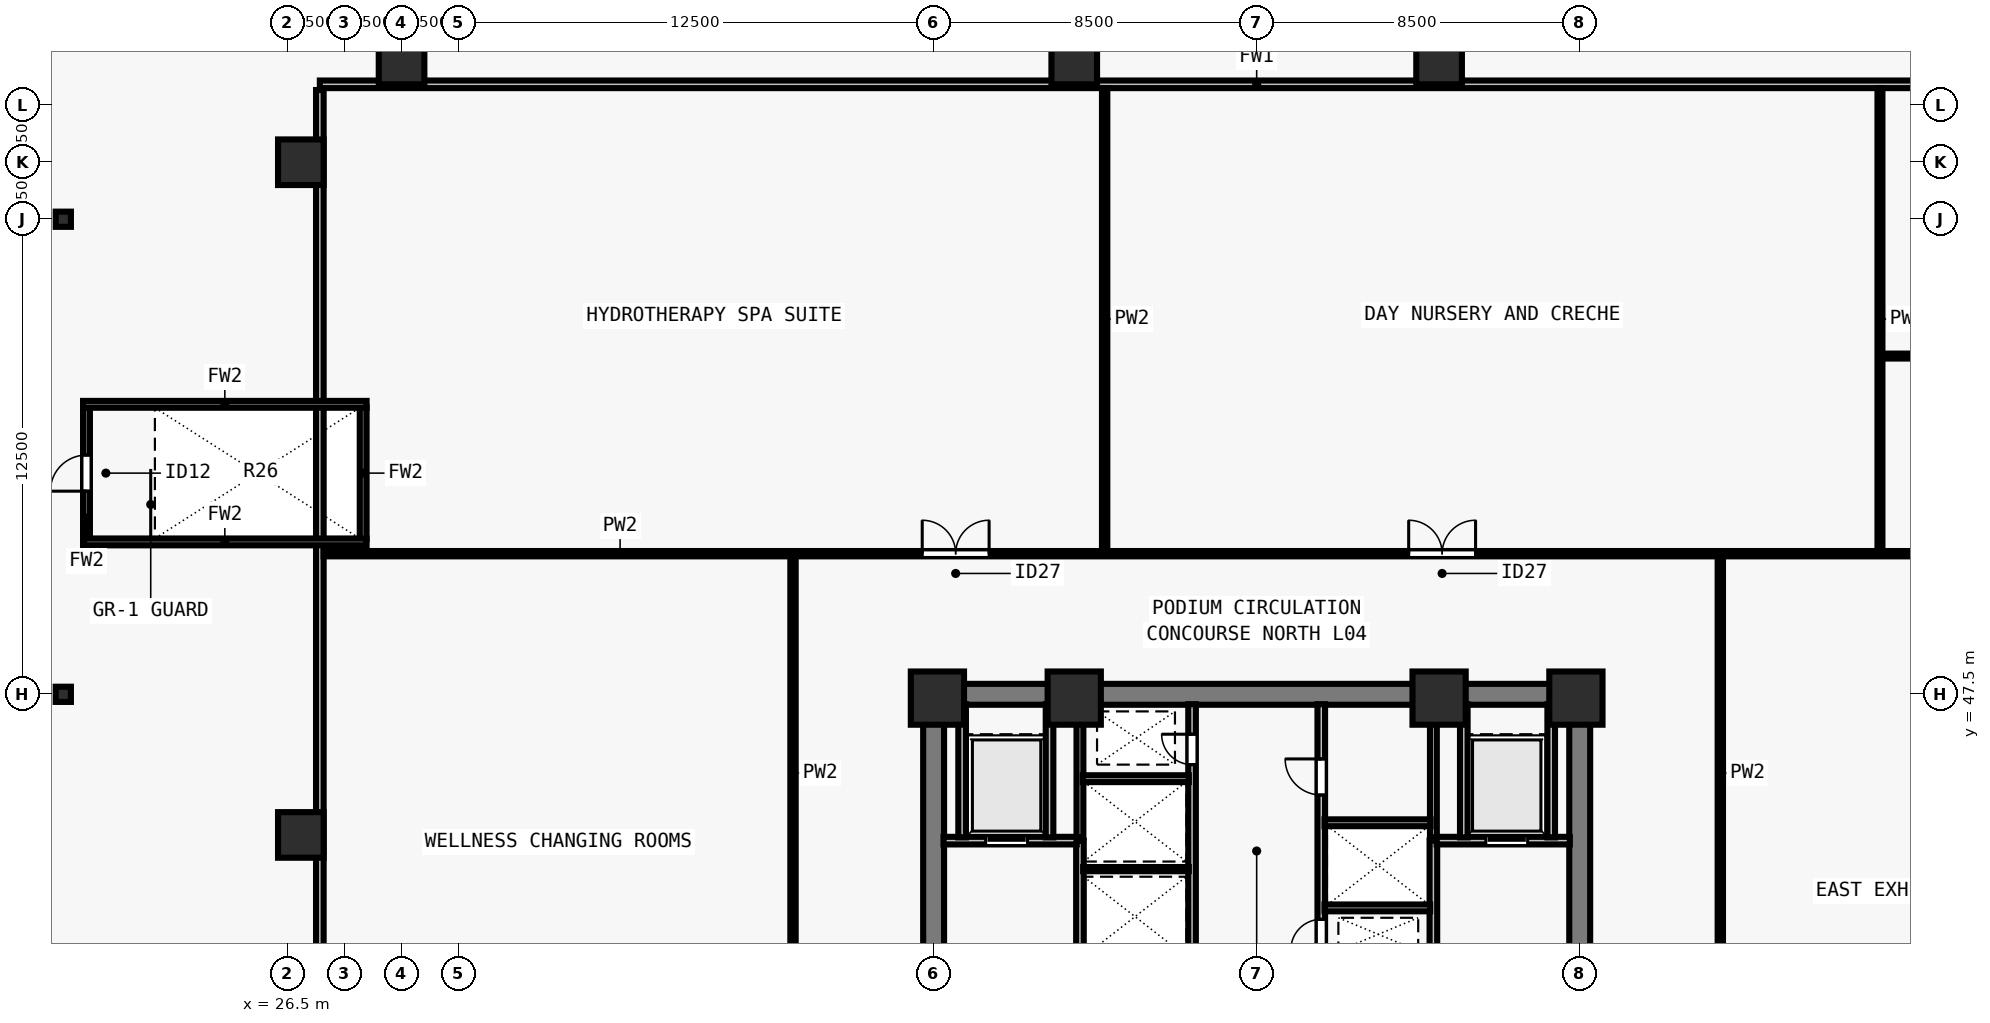
"""IFC4 building model, lengths in metres.
Left out: names, types, materials, properties, quantities, classifications, styles, units other than length and angle.
Written with IfcOpenShell. Run it as: python <this file> out.ifc"""

import sys

from ifc_helpers import new_model, si_unit, direction, frame, frame_2d, origin, origin_2d, place, context, subcontext, project, spatial, rectangle, i_section, extrude, element, fill, save


model = new_model("IFC4")
c1 = context("Model", 3, precision=1e-05, world=origin(), true_north=direction((0.0, 1.0)))
c2 = subcontext(c1, "Body", "Model", "MODEL_VIEW")
j1 = project(units=[si_unit("LENGTHUNIT", "METRE"), si_unit("PLANEANGLEUNIT", "RADIAN")], contexts=[c1])
p1 = place(None, origin())
s1 = spatial("IfcSite", under=j1, at=p1, CompositionType="ELEMENT")
p2 = place(p1, origin())
s2 = spatial("IfcBuilding", under=s1, at=p2, CompositionType="ELEMENT")
p3 = place(p2, frame((0.0, 0.0, 19.0)))
s3 = spatial("IfcBuildingStorey", under=s2, at=p3, CompositionType="ELEMENT", Elevation=19.0)
for number, where, z_axis, x_axis in (
    (1, (43.6, 47.4, 0.0), (0.0, 0.0, 1.0), (1.0, 0.0, 0.0)),
    (2, (47.2, 47.4, 0.0), (0.0, 0.0, 1.0), (1.0, 0.0, 0.0)),
    (3, (56.8, 47.4, 0.0), (0.0, 0.0, 1.0), (1.0, 0.0, 0.0)),
    (4, (60.4, 47.4, 0.0), (0.0, 0.0, 1.0), (1.0, 0.0, 0.0)),
):
    element("IfcColumn", number, at=place(p3, frame(where, z_axis=z_axis, x_axis=x_axis)), inside=s3, PredefinedType="COLUMN", context=c2, shape_type="SweptSolid", body=[
        extrude(rectangle(XDim=1.4, YDim=1.4, at=origin_2d()), origin(), (0.0, 0.0, 1.0), 4.5),
    ])
for number, where, z_axis, x_axis in (
    (5, (56.8, 64.15, 0.0), (0.0, 0.0, 1.0), (1.0, 0.0, 0.0)),
    (6, (47.2, 64.15, 0.0), (0.0, 0.0, 1.0), (1.0, 0.0, 0.0)),
    (7, (29.5, 64.15, 0.0), (0.0, 0.0, 1.0), (1.0, 0.0, 0.0)),
    (8, (26.85, 61.5, 0.0), (0.0, 0.0, 1.0), (1.0, 0.0, 0.0)),
    (9, (26.85, 43.8, 0.0), (0.0, 0.0, 1.0), (1.0, 0.0, 0.0)),
):
    element("IfcColumn", number, at=place(p3, frame(where, z_axis=z_axis, x_axis=x_axis)), inside=s3, PredefinedType="COLUMN", context=c2, shape_type="SweptSolid", body=[
        extrude(rectangle(XDim=1.2, YDim=1.2, at=origin_2d()), origin(), (0.0, 0.0, 1.0), 4.5),
    ])
for number, where, z_axis, x_axis in (
    (10, (20.6, 47.5, 0.0), (0.0, 0.0, 1.0), (1.0, 0.0, 0.0)),
    (11, (20.6, 60.0, 0.0), (0.0, 0.0, 1.0), (1.0, 0.0, 0.0)),
):
    element("IfcColumn", number, at=place(p3, frame(where, z_axis=z_axis, x_axis=x_axis)), inside=s3, PredefinedType="COLUMN", context=c2, shape_type="SweptSolid", body=[
        extrude(i_section(OverallWidth=0.4, OverallDepth=0.4, WebThickness=0.028, FlangeThickness=0.045, at=origin_2d()), origin(), (0.0, 0.0, 1.0), 4.5),
    ])
p4 = place(p3, frame((43.225, 47.5, 0.0), z_axis=(0.0, 0.0, 1.0), x_axis=(1.0, 0.0, 0.0)))
e12 = element("IfcWall", 12, at=p4, inside=s3, PredefinedType="SHEAR", context=c2, shape_type="SweptSolid", body=[
    extrude(rectangle(XDim=17.55, YDim=0.55, at=frame_2d((8.775, 0.0))), origin(), (0.0, 0.0, 1.0), 4.28),
])
for number, where, z_axis, x_axis in (
    (13, (43.5, 40.8, 0.0), (0.0, 0.0, 1.0), (0.0, 1.0, 0.0)),
    (14, (60.5, 40.8, 0.0), (0.0, 0.0, 1.0), (0.0, 1.0, 0.0)),
):
    element("IfcWall", number, at=place(p3, frame(where, z_axis=z_axis, x_axis=x_axis)), inside=s3, PredefinedType="SHEAR", context=c2, shape_type="SweptSolid", body=[
        extrude(rectangle(XDim=6.435, YDim=0.55, at=frame_2d((3.218, 0.0))), origin(), (0.0, 0.0, 1.0), 4.28),
    ])
p5 = place(p3, frame((50.3, 40.585, 0.0), z_axis=(0.0, 0.0, 1.0), x_axis=(0.0, 1.0, 0.0)))
e15 = element("IfcWall", 15, at=p5, inside=s3, PredefinedType="SOLIDWALL", context=c2, shape_type="SweptSolid", body=[
    extrude(rectangle(XDim=6.655, YDim=0.2, at=frame_2d((3.328, 0.0))), origin(), (0.0, 0.0, 1.0), 4.28),
])
p6 = place(p5, frame((5.065, 0.0, 0.0)))
e16 = element("IfcOpeningElement", 16, at=p6, cuts=e15, PredefinedType="OPENING", context=c2, shape_type="SweptSolid", body=[
    extrude(rectangle(XDim=0.8, YDim=2.08, at=frame_2d((0.4, 1.04))), frame((0.0, 0.11, 0.0), z_axis=(0.0, -1.0, 0.0), x_axis=(1.0, 0.0, 0.0)), (0.0, 0.0, 1.0), 0.22),
])
p7 = place(p3, frame((53.7, 40.585, 0.0), z_axis=(0.0, 0.0, 1.0), x_axis=(0.0, 1.0, 0.0)))
e17 = element("IfcWall", 17, at=p7, inside=s3, PredefinedType="SOLIDWALL", context=c2, shape_type="SweptSolid", body=[
    extrude(rectangle(XDim=6.655, YDim=0.2, at=frame_2d((3.328, 0.0))), origin(), (0.0, 0.0, 1.0), 4.28),
])
p8 = place(p7, frame((0.195, 0.0, 0.0)))
e18 = element("IfcOpeningElement", 18, at=p8, cuts=e17, PredefinedType="OPENING", context=c2, shape_type="SweptSolid", body=[
    extrude(rectangle(XDim=0.8, YDim=2.08, at=frame_2d((0.4, 1.04))), frame((0.0, 0.11, 0.0), z_axis=(0.0, -1.0, 0.0), x_axis=(1.0, 0.0, 0.0)), (0.0, 0.0, 1.0), 0.22),
])
p9 = place(p7, frame((4.265, 0.0, 0.0)))
e19 = element("IfcOpeningElement", 19, at=p9, cuts=e17, PredefinedType="OPENING", context=c2, shape_type="SweptSolid", body=[
    extrude(rectangle(XDim=0.95, YDim=2.12, at=frame_2d((0.475, 1.06))), frame((0.0, 0.11, 0.0), z_axis=(0.0, -1.0, 0.0), x_axis=(1.0, 0.0, 0.0)), (0.0, 0.0, 1.0), 0.22),
])
p10 = place(p3, frame((47.35, 38.785, 0.0), z_axis=(0.0, 0.0, 1.0), x_axis=(0.0, 1.0, 0.0)))
e20 = element("IfcWall", 20, at=p10, inside=s3, PredefinedType="SOLIDWALL", context=c2, shape_type="SweptSolid", body=[
    extrude(rectangle(XDim=4.865, YDim=0.2, at=frame_2d((2.433, 0.0))), origin(), (0.0, 0.0, 1.0), 4.28),
])
p11 = place(p10, frame((0.265, 0.0, 0.0)))
e21 = element("IfcOpeningElement", 21, at=p11, cuts=e20, PredefinedType="OPENING", context=c2, shape_type="SweptSolid", body=[
    extrude(rectangle(XDim=1.0, YDim=2.15, at=frame_2d((0.5, 1.075))), frame((0.0, 0.11, 0.0), z_axis=(0.0, -1.0, 0.0), x_axis=(1.0, 0.0, 0.0)), (0.0, 0.0, 1.0), 0.22),
])
p12 = place(p3, frame((43.76, 43.65, 0.0), z_axis=(0.0, 0.0, 1.0), x_axis=(1.0, 0.0, 0.0)))
e22 = element("IfcWall", 22, at=p12, inside=s3, PredefinedType="SOLIDWALL", context=c2, shape_type="SweptSolid", body=[
    extrude(rectangle(XDim=3.505, YDim=0.2, at=frame_2d((1.752, 0.0))), origin(), (0.0, 0.0, 1.0), 4.28),
])
p13 = place(p12, frame((1.11, 0.0, 0.0)))
e23 = element("IfcOpeningElement", 23, at=p13, cuts=e22, PredefinedType="OPENING", context=c2, shape_type="SweptSolid", body=[
    extrude(rectangle(XDim=1.1, YDim=2.2, at=frame_2d((0.55, 1.1))), frame((0.0, 0.11, 0.0), z_axis=(0.0, -1.0, 0.0), x_axis=(1.0, 0.0, 0.0)), (0.0, 0.0, 1.0), 0.22),
])
for number, where, z_axis, x_axis in (
    (24, (46.55, 43.735, 0.0), (0.0, 0.0, 1.0), (0.0, 1.0, 0.0)),
    (25, (44.25, 43.735, 0.0), (0.0, 0.0, 1.0), (0.0, 1.0, 0.0)),
):
    element("IfcWall", number, at=place(p3, frame(where, z_axis=z_axis, x_axis=x_axis)), inside=s3, PredefinedType="SOLIDWALL", context=c2, shape_type="SweptSolid", body=[
        extrude(rectangle(XDim=3.505, YDim=0.2, at=frame_2d((1.752, 0.0))), origin(), (0.0, 0.0, 1.0), 4.28),
    ])
p14 = place(p3, frame((56.65, 38.785, 0.0), z_axis=(0.0, 0.0, 1.0), x_axis=(0.0, 1.0, 0.0)))
e26 = element("IfcWall", 26, at=p14, inside=s3, PredefinedType="SOLIDWALL", context=c2, shape_type="SweptSolid", body=[
    extrude(rectangle(XDim=4.865, YDim=0.2, at=frame_2d((2.433, 0.0))), origin(), (0.0, 0.0, 1.0), 4.28),
])
p15 = place(p14, frame((0.265, 0.0, 0.0)))
e27 = element("IfcOpeningElement", 27, at=p15, cuts=e26, PredefinedType="OPENING", context=c2, shape_type="SweptSolid", body=[
    extrude(rectangle(XDim=1.0, YDim=2.15, at=frame_2d((0.5, 1.075))), frame((0.0, 0.11, 0.0), z_axis=(0.0, -1.0, 0.0), x_axis=(1.0, 0.0, 0.0)), (0.0, 0.0, 1.0), 0.22),
])
p16 = place(p3, frame((56.735, 43.65, 0.0), z_axis=(0.0, 0.0, 1.0), x_axis=(1.0, 0.0, 0.0)))
e28 = element("IfcWall", 28, at=p16, inside=s3, PredefinedType="SOLIDWALL", context=c2, shape_type="SweptSolid", body=[
    extrude(rectangle(XDim=3.505, YDim=0.2, at=frame_2d((1.752, 0.0))), origin(), (0.0, 0.0, 1.0), 4.28),
])
p17 = place(p16, frame((1.295, 0.0, 0.0)))
e29 = element("IfcOpeningElement", 29, at=p17, cuts=e28, PredefinedType="OPENING", context=c2, shape_type="SweptSolid", body=[
    extrude(rectangle(XDim=1.1, YDim=2.2, at=frame_2d((0.55, 1.1))), frame((0.0, 0.11, 0.0), z_axis=(0.0, -1.0, 0.0), x_axis=(1.0, 0.0, 0.0)), (0.0, 0.0, 1.0), 0.22),
])
for number, where, z_axis, x_axis in (
    (30, (57.45, 43.735, 0.0), (0.0, 0.0, 1.0), (0.0, 1.0, 0.0)),
    (31, (59.75, 43.735, 0.0), (0.0, 0.0, 1.0), (0.0, 1.0, 0.0)),
):
    element("IfcWall", number, at=place(p3, frame(where, z_axis=z_axis, x_axis=x_axis)), inside=s3, PredefinedType="SOLIDWALL", context=c2, shape_type="SweptSolid", body=[
        extrude(rectangle(XDim=3.505, YDim=0.2, at=frame_2d((1.752, 0.0))), origin(), (0.0, 0.0, 1.0), 4.28),
    ])
p18 = place(p3, frame((47.35, 43.735, 0.0), z_axis=(0.0, 0.0, 1.0), x_axis=(0.0, 1.0, 0.0)))
e32 = element("IfcWall", 32, at=p18, inside=s3, PredefinedType="SOLIDWALL", context=c2, shape_type="SweptSolid", body=[
    extrude(rectangle(XDim=3.505, YDim=0.18, at=frame_2d((1.752, 0.0))), origin(), (0.0, 0.0, 1.0), 4.28),
])
p19 = place(p3, frame((47.435, 42.9, 0.0), z_axis=(0.0, 0.0, 1.0), x_axis=(1.0, 0.0, 0.0)))
e33 = element("IfcWall", 33, at=p19, inside=s3, PredefinedType="PARTITIONING", context=c2, shape_type="SweptSolid", body=[
    extrude(rectangle(XDim=2.78, YDim=0.11, at=frame_2d((1.39, 0.0))), origin(), (0.0, 0.0, 1.0), 4.28),
])
p20 = place(p3, frame((47.425, 45.28, 0.0), z_axis=(0.0, 0.0, 1.0), x_axis=(1.0, 0.0, 0.0)))
e34 = element("IfcWall", 34, at=p20, inside=s3, PredefinedType="SOLIDWALL", context=c2, shape_type="SweptSolid", body=[
    extrude(rectangle(XDim=2.79, YDim=0.18, at=frame_2d((1.395, 0.0))), origin(), (0.0, 0.0, 1.0), 4.28),
])
p21 = place(p3, frame((56.65, 43.735, 0.0), z_axis=(0.0, 0.0, 1.0), x_axis=(0.0, 1.0, 0.0)))
e35 = element("IfcWall", 35, at=p21, inside=s3, PredefinedType="SOLIDWALL", context=c2, shape_type="SweptSolid", body=[
    extrude(rectangle(XDim=3.505, YDim=0.18, at=frame_2d((1.752, 0.0))), origin(), (0.0, 0.0, 1.0), 4.28),
])
p22 = place(p3, frame((53.785, 41.88, 0.0), z_axis=(0.0, 0.0, 1.0), x_axis=(1.0, 0.0, 0.0)))
e36 = element("IfcWall", 36, at=p22, inside=s3, PredefinedType="SOLIDWALL", context=c2, shape_type="SweptSolid", body=[
    extrude(rectangle(XDim=2.78, YDim=0.18, at=frame_2d((1.39, 0.0))), origin(), (0.0, 0.0, 1.0), 4.28),
])
p23 = place(p3, frame((53.785, 44.12, 0.0), z_axis=(0.0, 0.0, 1.0), x_axis=(1.0, 0.0, 0.0)))
e37 = element("IfcWall", 37, at=p23, inside=s3, PredefinedType="SOLIDWALL", context=c2, shape_type="SweptSolid", body=[
    extrude(rectangle(XDim=2.79, YDim=0.18, at=frame_2d((1.395, 0.0))), origin(), (0.0, 0.0, 1.0), 4.28),
])
p24 = place(p3, frame((27.35, 63.55, 0.0), z_axis=(0.0, 0.0, 1.0), x_axis=(1.0, 0.0, 0.0)))
e38 = element("IfcWall", 38, at=p24, inside=s3, PredefinedType="SOLIDWALL", context=c2, shape_type="SweptSolid", body=[
    extrude(rectangle(XDim=49.3, YDim=0.2, at=frame_2d((24.65, 0.0))), origin(), (0.0, 0.0, 1.0), 2.455),
])
p25 = place(p3, frame((27.35, 14.6, 0.0), z_axis=(0.0, 0.0, 1.0), x_axis=(0.0, 1.0, 0.0)))
e39 = element("IfcWall", 39, at=p25, inside=s3, PredefinedType="SOLIDWALL", context=c2, shape_type="SweptSolid", body=[
    extrude(rectangle(XDim=48.8, YDim=0.2, at=frame_2d((24.4, 0.0))), origin(), (0.0, 0.0, 1.0), 2.455),
])
p26 = place(p3, frame((27.45, 51.2, 0.0), z_axis=(0.0, 0.0, 1.0), x_axis=(1.0, 0.0, 0.0)))
e40 = element("IfcWall", 40, at=p26, inside=s3, PredefinedType="PARTITIONING", context=c2, shape_type="SweptSolid", body=[
    extrude(rectangle(XDim=49.1, YDim=0.14, at=frame_2d((24.55, 0.0))), origin(), (0.0, 0.0, 1.0), 3.798),
])
p27 = place(p26, frame((15.75, 0.0, 0.0)))
e41 = element("IfcOpeningElement", 41, at=p27, cuts=e40, PredefinedType="OPENING", context=c2, shape_type="SweptSolid", body=[
    extrude(rectangle(XDim=1.76, YDim=2.2, at=frame_2d((0.88, 1.1))), frame((0.0, 0.08, 0.0), z_axis=(0.0, -1.0, 0.0), x_axis=(1.0, 0.0, 0.0)), (0.0, 0.0, 1.0), 0.16),
])
p28 = place(p26, frame((28.55, 0.0, 0.0)))
e42 = element("IfcOpeningElement", 42, at=p28, cuts=e40, PredefinedType="OPENING", context=c2, shape_type="SweptSolid", body=[
    extrude(rectangle(XDim=1.76, YDim=2.2, at=frame_2d((0.88, 1.1))), frame((0.0, 0.08, 0.0), z_axis=(0.0, -1.0, 0.0), x_axis=(1.0, 0.0, 0.0)), (0.0, 0.0, 1.0), 0.16),
])
p29 = place(p26, frame((42.55, 0.0, 0.0)))
e43 = element("IfcOpeningElement", 43, at=p29, cuts=e40, PredefinedType="OPENING", context=c2, shape_type="SweptSolid", body=[
    extrude(rectangle(XDim=0.95, YDim=2.1, at=frame_2d((0.475, 1.05))), frame((0.0, 0.08, 0.0), z_axis=(0.0, -1.0, 0.0), x_axis=(1.0, 0.0, 0.0)), (0.0, 0.0, 1.0), 0.16),
])
p30 = place(p26, frame((46.75, 0.0, 0.0)))
e44 = element("IfcOpeningElement", 44, at=p30, cuts=e40, PredefinedType="OPENING", context=c2, shape_type="SweptSolid", body=[
    extrude(rectangle(XDim=1.76, YDim=2.2, at=frame_2d((0.88, 1.1))), frame((0.0, 0.08, 0.0), z_axis=(0.0, -1.0, 0.0), x_axis=(1.0, 0.0, 0.0)), (0.0, 0.0, 1.0), 0.16),
])
p31 = place(p3, frame((39.8, 26.855, 0.0), z_axis=(0.0, 0.0, 1.0), x_axis=(0.0, 1.0, 0.0)))
e45 = element("IfcWall", 45, at=p31, inside=s3, PredefinedType="PARTITIONING", context=c2, shape_type="SweptSolid", body=[
    extrude(rectangle(XDim=24.29, YDim=0.14, at=frame_2d((12.145, 0.0))), origin(), (0.0, 0.0, 1.0), 4.28),
])
p32 = place(p31, frame((10.945, 0.0, 0.0)))
e46 = element("IfcOpeningElement", 46, at=p32, cuts=e45, PredefinedType="OPENING", context=c2, shape_type="SweptSolid", body=[
    extrude(rectangle(XDim=1.76, YDim=2.2, at=frame_2d((0.88, 1.1))), frame((0.0, 0.08, 0.0), z_axis=(0.0, -1.0, 0.0), x_axis=(1.0, 0.0, 0.0)), (0.0, 0.0, 1.0), 0.16),
])
p33 = place(p3, frame((64.2, 26.855, 0.0), z_axis=(0.0, 0.0, 1.0), x_axis=(0.0, 1.0, 0.0)))
e47 = element("IfcWall", 47, at=p33, inside=s3, PredefinedType="PARTITIONING", context=c2, shape_type="SweptSolid", body=[
    extrude(rectangle(XDim=24.29, YDim=0.14, at=frame_2d((12.145, 0.0))), origin(), (0.0, 0.0, 1.0), 4.28),
])
p34 = place(p33, frame((10.945, 0.0, 0.0)))
e48 = element("IfcOpeningElement", 48, at=p34, cuts=e47, PredefinedType="OPENING", context=c2, shape_type="SweptSolid", body=[
    extrude(rectangle(XDim=1.76, YDim=2.2, at=frame_2d((0.88, 1.1))), frame((0.0, 0.08, 0.0), z_axis=(0.0, -1.0, 0.0), x_axis=(1.0, 0.0, 0.0)), (0.0, 0.0, 1.0), 0.16),
])
p35 = place(p3, frame((48.0, 51.3, 0.0), z_axis=(0.0, 0.0, 1.0), x_axis=(0.0, 1.0, 0.0)))
e49 = element("IfcWall", 49, at=p35, inside=s3, PredefinedType="PARTITIONING", context=c2, shape_type="SweptSolid", body=[
    extrude(rectangle(XDim=12.15, YDim=0.14, at=frame_2d((6.075, 0.0))), origin(), (0.0, 0.0, 1.0), 4.28),
])
p36 = place(p3, frame((68.4, 51.3, 0.0), z_axis=(0.0, 0.0, 1.0), x_axis=(0.0, 1.0, 0.0)))
e50 = element("IfcWall", 50, at=p36, inside=s3, PredefinedType="PLUMBINGWALL", context=c2, shape_type="SweptSolid", body=[
    extrude(rectangle(XDim=12.15, YDim=0.13, at=frame_2d((6.075, 0.0))), origin(), (0.0, 0.0, 1.0), 2.455),
])
p37 = place(p3, frame((68.45, 56.4, 0.0), z_axis=(0.0, 0.0, 1.0), x_axis=(1.0, 0.0, 0.0)))
e51 = element("IfcWall", 51, at=p37, inside=s3, PredefinedType="PLUMBINGWALL", context=c2, shape_type="SweptSolid", body=[
    extrude(rectangle(XDim=4.1, YDim=0.13, at=frame_2d((2.05, 0.0))), origin(), (0.0, 0.0, 1.0), 3.798),
])
p38 = place(p3, frame((21.21, 51.585, 0.0), z_axis=(0.0, 0.0, 1.0), x_axis=(0.0, 1.0, 0.0)))
e52 = element("IfcWall", 52, at=p38, inside=s3, PredefinedType="SOLIDWALL", context=c2, shape_type="SweptSolid", body=[
    extrude(rectangle(XDim=3.47, YDim=0.18, at=frame_2d((1.735, 0.0))), origin(), (0.0, 0.0, 1.0), 4.28),
])
p39 = place(p38, frame((1.26, 0.0, 0.0)))
e53 = element("IfcOpeningElement", 53, at=p39, cuts=e52, PredefinedType="OPENING", context=c2, shape_type="SweptSolid", body=[
    extrude(rectangle(XDim=0.95, YDim=2.15, at=frame_2d((0.475, 1.075))), frame((0.0, 0.1, 0.0), z_axis=(0.0, -1.0, 0.0), x_axis=(1.0, 0.0, 0.0)), (0.0, 0.0, 1.0), 0.2),
])
p40 = place(p3, frame((28.49, 51.585, 0.0), z_axis=(0.0, 0.0, 1.0), x_axis=(0.0, 1.0, 0.0)))
e54 = element("IfcWall", 54, at=p40, inside=s3, PredefinedType="SOLIDWALL", context=c2, shape_type="SweptSolid", body=[
    extrude(rectangle(XDim=3.47, YDim=0.18, at=frame_2d((1.735, 0.0))), origin(), (0.0, 0.0, 1.0), 4.28),
])
for number, where, z_axis, x_axis in (
    (55, (21.12, 51.51, 0.0), (0.0, 0.0, 1.0), (1.0, 0.0, 0.0)),
    (56, (21.12, 55.13, 0.0), (0.0, 0.0, 1.0), (1.0, 0.0, 0.0)),
):
    element("IfcWall", number, at=place(p3, frame(where, z_axis=z_axis, x_axis=x_axis)), inside=s3, PredefinedType="SOLIDWALL", context=c2, shape_type="SweptSolid", body=[
        extrude(rectangle(XDim=7.46, YDim=0.18, at=frame_2d((3.73, 0.0))), origin(), (0.0, 0.0, 1.0), 4.28),
    ])
p41 = place(p13, origin())
e57 = element("IfcDoor", 57, at=p41, inside=s3, OperationType="SLIDING_TO_LEFT", PredefinedType="DOOR", context=c2, shape_type="SweptSolid", body=[
    extrude(rectangle(XDim=1.1, YDim=2.2, at=frame_2d((0.55, 1.1))), frame((0.0, 0.025, 0.0), z_axis=(0.0, -1.0, 0.0), x_axis=(1.0, 0.0, 0.0)), (0.0, 0.0, 1.0), 0.05),
])
fill(e23, e57)
p42 = place(p17, origin())
e58 = element("IfcDoor", 58, at=p42, inside=s3, OperationType="SLIDING_TO_LEFT", PredefinedType="DOOR", context=c2, shape_type="SweptSolid", body=[
    extrude(rectangle(XDim=1.1, YDim=2.2, at=frame_2d((0.55, 1.1))), frame((0.0, 0.025, 0.0), z_axis=(0.0, -1.0, 0.0), x_axis=(1.0, 0.0, 0.0)), (0.0, 0.0, 1.0), 0.05),
])
fill(e29, e58)
p43 = place(p6, origin())
e59 = element("IfcDoor", 59, at=p43, inside=s3, OperationType="SINGLE_SWING_RIGHT", PredefinedType="DOOR", context=c2, shape_type="SweptSolid", body=[
    extrude(rectangle(XDim=0.8, YDim=2.08, at=frame_2d((0.4, 1.04))), frame((0.0, 0.025, 0.0), z_axis=(0.0, -1.0, 0.0), x_axis=(1.0, 0.0, 0.0)), (0.0, 0.0, 1.0), 0.05),
])
fill(e16, e59)
p44 = place(p8, origin())
e60 = element("IfcDoor", 60, at=p44, inside=s3, OperationType="SINGLE_SWING_LEFT", PredefinedType="DOOR", context=c2, shape_type="SweptSolid", body=[
    extrude(rectangle(XDim=0.8, YDim=2.08, at=frame_2d((0.4, 1.04))), frame((0.0, 0.025, 0.0), z_axis=(0.0, -1.0, 0.0), x_axis=(1.0, 0.0, 0.0)), (0.0, 0.0, 1.0), 0.05),
])
fill(e18, e60)
p45 = place(p9, origin())
e61 = element("IfcDoor", 61, at=p45, inside=s3, OperationType="SINGLE_SWING_RIGHT", PredefinedType="DOOR", context=c2, shape_type="SweptSolid", body=[
    extrude(rectangle(XDim=0.95, YDim=2.12, at=frame_2d((0.475, 1.06))), frame((0.0, 0.025, 0.0), z_axis=(0.0, -1.0, 0.0), x_axis=(1.0, 0.0, 0.0)), (0.0, 0.0, 1.0), 0.05),
])
fill(e19, e61)
p46 = place(p27, origin())
e62 = element("IfcDoor", 62, at=p46, inside=s3, OperationType="DOUBLE_DOOR_SINGLE_SWING", PredefinedType="DOOR", context=c2, shape_type="SweptSolid", body=[
    extrude(rectangle(XDim=1.76, YDim=2.2, at=frame_2d((0.88, 1.1))), frame((0.0, 0.025, 0.0), z_axis=(0.0, -1.0, 0.0), x_axis=(1.0, 0.0, 0.0)), (0.0, 0.0, 1.0), 0.05),
])
fill(e41, e62)
p47 = place(p28, origin())
e63 = element("IfcDoor", 63, at=p47, inside=s3, OperationType="DOUBLE_DOOR_SINGLE_SWING", PredefinedType="DOOR", context=c2, shape_type="SweptSolid", body=[
    extrude(rectangle(XDim=1.76, YDim=2.2, at=frame_2d((0.88, 1.1))), frame((0.0, 0.025, 0.0), z_axis=(0.0, -1.0, 0.0), x_axis=(1.0, 0.0, 0.0)), (0.0, 0.0, 1.0), 0.05),
])
fill(e42, e63)
p48 = place(p39, origin())
e64 = element("IfcDoor", 64, at=p48, inside=s3, OperationType="SINGLE_SWING_LEFT", PredefinedType="DOOR", context=c2, shape_type="SweptSolid", body=[
    extrude(rectangle(XDim=0.95, YDim=2.15, at=frame_2d((0.475, 1.075))), frame((0.0, 0.025, 0.0), z_axis=(0.0, -1.0, 0.0), x_axis=(1.0, 0.0, 0.0)), (0.0, 0.0, 1.0), 0.05),
])
fill(e53, e64)
save(model, sys.argv[1])
